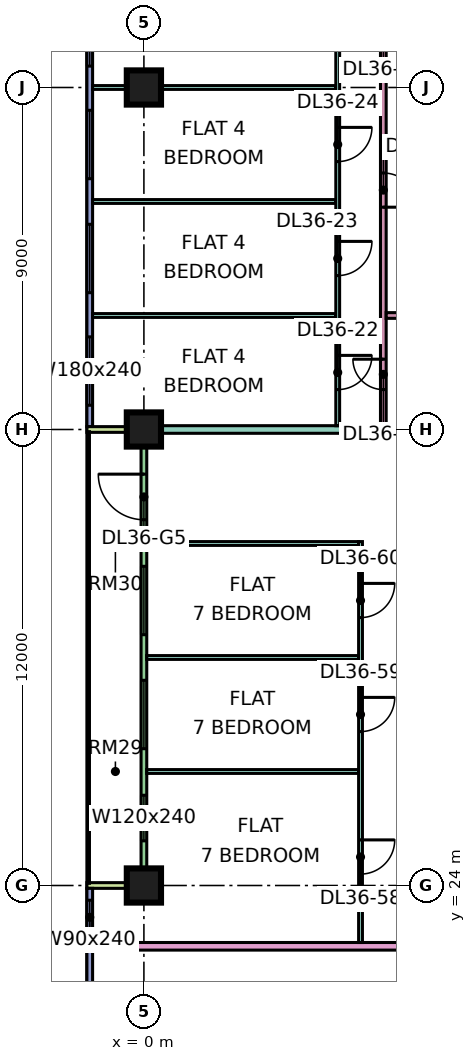
"""IFC4 building model, lengths in metres.
Left out: names, types, materials, properties, quantities, classifications, styles, units other than length and angle.
Written with IfcOpenShell. Run it as: python <this file> out.ifc"""

import sys

from ifc_helpers import new_model, si_unit, direction, frame, frame_2d, origin, origin_2d, place, context, subcontext, project, spatial, rectangle, extrude, element, fill, save


model = new_model("IFC4")
c1 = context("Model", 3, precision=1e-05, world=origin(), true_north=direction((0.0, 1.0)))
c2 = subcontext(c1, "Body", "Model", "MODEL_VIEW")
j1 = project(units=[si_unit("LENGTHUNIT", "METRE"), si_unit("PLANEANGLEUNIT", "RADIAN")], contexts=[c1])
p1 = place(None, origin())
s1 = spatial("IfcSite", under=j1, at=p1, CompositionType="ELEMENT")
p2 = place(p1, origin())
s2 = spatial("IfcBuilding", under=s1, at=p2, CompositionType="ELEMENT")
p3 = place(p2, frame((0.0, 0.0, 161.15)))
s3 = spatial("IfcBuildingStorey", under=s2, at=p3, CompositionType="ELEMENT", Elevation=161.15)
p4 = place(p3, frame((0.0, 24.0, 0.0), z_axis=(0.0, 0.0, 1.0), x_axis=(1.0, 0.0, 0.0)))
e1 = element("IfcColumn", 1, at=p4, inside=s3, PredefinedType="COLUMN", context=c2, shape_type="SweptSolid", body=[
    extrude(rectangle(XDim=0.9, YDim=0.9, at=origin_2d()), origin(), (0.0, 0.0, 1.0), 3.75),
])
p5 = place(p3, frame((0.0, 36.0, 0.0), z_axis=(0.0, 0.0, 1.0), x_axis=(1.0, 0.0, 0.0)))
e2 = element("IfcColumn", 2, at=p5, inside=s3, PredefinedType="COLUMN", context=c2, shape_type="SweptSolid", body=[
    extrude(rectangle(XDim=0.9, YDim=0.9, at=origin_2d()), origin(), (0.0, 0.0, 1.0), 3.75),
])
p6 = place(p3, frame((0.0, 45.0, 0.0), z_axis=(0.0, 0.0, 1.0), x_axis=(1.0, 0.0, 0.0)))
e3 = element("IfcColumn", 3, at=p6, inside=s3, PredefinedType="COLUMN", context=c2, shape_type="SweptSolid", body=[
    extrude(rectangle(XDim=0.9, YDim=0.9, at=origin_2d()), origin(), (0.0, 0.0, 1.0), 3.75),
])
p7 = place(p3, frame((-1.425, 47.925, 0.0), z_axis=(0.0, 0.0, 1.0), x_axis=(0.0, -1.0, 0.0)))
e4 = element("IfcWall", 4, at=p7, inside=s3, PredefinedType="SOLIDWALL", context=c2, shape_type="SweptSolid", body=[
    extrude(rectangle(XDim=11.85, YDim=0.15, at=frame_2d((5.925, 0.0))), origin(), (0.0, 0.0, 1.0), 3.35),
])
p8 = place(p7, frame((0.562, 0.0, 0.45)))
e5 = element("IfcOpeningElement", 5, at=p8, cuts=e4, PredefinedType="OPENING", context=c2, shape_type="SweptSolid", body=[
    extrude(rectangle(XDim=1.8, YDim=2.4, at=frame_2d((0.9, 1.2))), frame((0.0, 0.085, 0.0), z_axis=(0.0, -1.0, 0.0), x_axis=(1.0, 0.0, 0.0)), (0.0, 0.0, 1.0), 0.17),
])
p9 = place(p7, frame((3.525, 0.0, 0.45)))
e6 = element("IfcOpeningElement", 6, at=p9, cuts=e4, PredefinedType="OPENING", context=c2, shape_type="SweptSolid", body=[
    extrude(rectangle(XDim=1.8, YDim=2.4, at=frame_2d((0.9, 1.2))), frame((0.0, 0.085, 0.0), z_axis=(0.0, -1.0, 0.0), x_axis=(1.0, 0.0, 0.0)), (0.0, 0.0, 1.0), 0.17),
])
p10 = place(p7, frame((6.525, 0.0, 0.45)))
e7 = element("IfcOpeningElement", 7, at=p10, cuts=e4, PredefinedType="OPENING", context=c2, shape_type="SweptSolid", body=[
    extrude(rectangle(XDim=1.8, YDim=2.4, at=frame_2d((0.9, 1.2))), frame((0.0, 0.085, 0.0), z_axis=(0.0, -1.0, 0.0), x_axis=(1.0, 0.0, 0.0)), (0.0, 0.0, 1.0), 0.17),
])
p11 = place(p7, frame((9.488, 0.0, 0.45)))
e8 = element("IfcOpeningElement", 8, at=p11, cuts=e4, PredefinedType="OPENING", context=c2, shape_type="SweptSolid", body=[
    extrude(rectangle(XDim=1.8, YDim=2.4, at=frame_2d((0.9, 1.2))), frame((0.0, 0.085, 0.0), z_axis=(0.0, -1.0, 0.0), x_axis=(1.0, 0.0, 0.0)), (0.0, 0.0, 1.0), 0.17),
])
p12 = place(p3, frame((0.0, 35.925, 0.0), z_axis=(0.0, 0.0, 1.0), x_axis=(0.0, -1.0, 0.0)))
e9 = element("IfcWall", 9, at=p12, inside=s3, PredefinedType="SOLIDWALL", context=c2, shape_type="SweptSolid", body=[
    extrude(rectangle(XDim=11.85, YDim=0.15, at=frame_2d((5.925, 0.0))), origin(), (0.0, 0.0, 1.0), 3.35),
])
p13 = place(p12, frame((1.1, 0.0, 0.0)))
e10 = element("IfcOpeningElement", 10, at=p13, cuts=e9, PredefinedType="OPENING", context=c2, shape_type="SweptSolid", body=[
    extrude(rectangle(XDim=1.2, YDim=2.4, at=frame_2d((0.6, 1.2))), frame((0.0, 0.085, 0.0), z_axis=(0.0, -1.0, 0.0), x_axis=(1.0, 0.0, 0.0)), (0.0, 0.0, 1.0), 0.17),
])
p14 = place(p12, frame((3.525, 0.0, 0.45)))
e11 = element("IfcOpeningElement", 11, at=p14, cuts=e9, PredefinedType="OPENING", context=c2, shape_type="SweptSolid", body=[
    extrude(rectangle(XDim=1.8, YDim=2.4, at=frame_2d((0.9, 1.2))), frame((0.0, 0.085, 0.0), z_axis=(0.0, -1.0, 0.0), x_axis=(1.0, 0.0, 0.0)), (0.0, 0.0, 1.0), 0.17),
])
p15 = place(p12, frame((6.525, 0.0, 0.45)))
e12 = element("IfcOpeningElement", 12, at=p15, cuts=e9, PredefinedType="OPENING", context=c2, shape_type="SweptSolid", body=[
    extrude(rectangle(XDim=1.8, YDim=2.4, at=frame_2d((0.9, 1.2))), frame((0.0, 0.085, 0.0), z_axis=(0.0, -1.0, 0.0), x_axis=(1.0, 0.0, 0.0)), (0.0, 0.0, 1.0), 0.17),
])
p16 = place(p12, frame((9.55, 0.0, 0.45)))
e13 = element("IfcOpeningElement", 13, at=p16, cuts=e9, PredefinedType="OPENING", context=c2, shape_type="SweptSolid", body=[
    extrude(rectangle(XDim=1.2, YDim=2.4, at=frame_2d((0.6, 1.2))), frame((0.0, 0.085, 0.0), z_axis=(0.0, -1.0, 0.0), x_axis=(1.0, 0.0, 0.0)), (0.0, 0.0, 1.0), 0.17),
])
for number, where, z_axis, x_axis in (
    (14, (-1.5, 36.0, 0.0), (0.0, 0.0, 1.0), (1.0, 0.0, 0.0)),
    (15, (-1.5, 24.0, 0.0), (0.0, 0.0, 1.0), (1.0, 0.0, 0.0)),
):
    element("IfcWall", number, at=place(p3, frame(where, z_axis=z_axis, x_axis=x_axis)), inside=s3, PredefinedType="SOLIDWALL", context=c2, shape_type="SweptSolid", body=[
        extrude(rectangle(XDim=1.5, YDim=0.15, at=frame_2d((0.75, 0.0))), origin(), (0.0, 0.0, 1.0), 3.35),
    ])
p17 = place(p3, frame((-1.425, 23.925, 0.0), z_axis=(0.0, 0.0, 1.0), x_axis=(0.0, -1.0, 0.0)))
e16 = element("IfcWall", 16, at=p17, inside=s3, PredefinedType="SOLIDWALL", context=c2, shape_type="SweptSolid", body=[
    extrude(rectangle(XDim=11.425, YDim=0.15, at=frame_2d((5.712, 0.0))), origin(), (0.0, 0.0, 1.0), 3.35),
])
p18 = place(p17, frame((0.312, 0.0, 0.45)))
e17 = element("IfcOpeningElement", 17, at=p18, cuts=e16, PredefinedType="OPENING", context=c2, shape_type="SweptSolid", body=[
    extrude(rectangle(XDim=0.9, YDim=2.4, at=frame_2d((0.45, 1.2))), frame((0.0, 0.085, 0.0), z_axis=(0.0, -1.0, 0.0), x_axis=(1.0, 0.0, 0.0)), (0.0, 0.0, 1.0), 0.17),
])
p19 = place(p17, frame((6.175, 0.0, 0.45)))
e18 = element("IfcOpeningElement", 18, at=p19, cuts=e16, PredefinedType="OPENING", context=c2, shape_type="SweptSolid", body=[
    extrude(rectangle(XDim=3.0, YDim=2.4, at=frame_2d((1.5, 1.2))), frame((0.0, 0.085, 0.0), z_axis=(0.0, -1.0, 0.0), x_axis=(1.0, 0.0, 0.0)), (0.0, 0.0, 1.0), 0.17),
])
for number, where, z_axis, x_axis in (
    (19, (-1.351, 39.0, 0.0), (0.0, 0.0, 1.0), (1.0, 0.0, 0.0)),
    (20, (-1.351, 42.0, 0.0), (0.0, 0.0, 1.0), (1.0, 0.0, 0.0)),
    (21, (-1.351, 45.0, 0.0), (0.0, 0.0, 1.0), (1.0, 0.0, 0.0)),
):
    element("IfcWall", number, at=place(p3, frame(where, z_axis=z_axis, x_axis=x_axis)), inside=s3, PredefinedType="PARTITIONING", context=c2, shape_type="SweptSolid", body=[
        extrude(rectangle(XDim=6.401, YDim=0.1, at=frame_2d((3.201, 0.0))), origin(), (0.0, 0.0, 1.0), 3.35),
    ])
p20 = place(p3, frame((-1.35, 22.4, 0.0), z_axis=(0.0, 0.0, 1.0), x_axis=(1.0, 0.0, 0.0)))
e22 = element("IfcWall", 22, at=p20, inside=s3, PredefinedType="PARTITIONING", context=c2, shape_type="SweptSolid", body=[
    extrude(rectangle(XDim=10.85, YDim=0.2, at=frame_2d((5.425, 0.0))), origin(), (0.0, 0.0, 1.0), 3.35),
])
e23 = element("IfcWall", 23, at=p5, inside=s3, PredefinedType="PARTITIONING", context=c2, shape_type="SweptSolid", body=[
    extrude(rectangle(XDim=9.5, YDim=0.2, at=frame_2d((4.75, 0.0))), origin(), (0.0, 0.0, 1.0), 3.35),
])
for number, where, z_axis, x_axis in (
    (24, (0.074, 27.0, 0.0), (0.0, 0.0, 1.0), (1.0, 0.0, 0.0)),
    (25, (0.074, 30.0, 0.0), (0.0, 0.0, 1.0), (1.0, 0.0, 0.0)),
    (26, (0.074, 33.0, 0.0), (0.0, 0.0, 1.0), (1.0, 0.0, 0.0)),
):
    element("IfcWall", number, at=place(p3, frame(where, z_axis=z_axis, x_axis=x_axis)), inside=s3, PredefinedType="PARTITIONING", context=c2, shape_type="SweptSolid", body=[
        extrude(rectangle(XDim=5.576, YDim=0.1, at=frame_2d((2.788, 0.0))), origin(), (0.0, 0.0, 1.0), 3.35),
    ])
p21 = place(p3, frame((5.1, 36.1, 0.0), z_axis=(0.0, 0.0, 1.0), x_axis=(0.0, 1.0, 0.0)))
e27 = element("IfcWall", 27, at=p21, inside=s3, PredefinedType="PARTITIONING", context=c2, shape_type="SweptSolid", body=[
    extrude(rectangle(XDim=26.826, YDim=0.1, at=frame_2d((13.413, 0.0))), origin(), (0.0, 0.0, 1.0), 3.35),
])
p22 = place(p21, frame((0.95, 0.0, 0.0)))
e28 = element("IfcOpeningElement", 28, at=p22, cuts=e27, PredefinedType="OPENING", context=c2, shape_type="SweptSolid", body=[
    extrude(rectangle(XDim=0.9, YDim=2.1, at=frame_2d((0.45, 1.05))), frame((0.0, 0.06, 0.0), z_axis=(0.0, -1.0, 0.0), x_axis=(1.0, 0.0, 0.0)), (0.0, 0.0, 1.0), 0.12),
])
p23 = place(p21, frame((3.95, 0.0, 0.0)))
e29 = element("IfcOpeningElement", 29, at=p23, cuts=e27, PredefinedType="OPENING", context=c2, shape_type="SweptSolid", body=[
    extrude(rectangle(XDim=0.9, YDim=2.1, at=frame_2d((0.45, 1.05))), frame((0.0, 0.06, 0.0), z_axis=(0.0, -1.0, 0.0), x_axis=(1.0, 0.0, 0.0)), (0.0, 0.0, 1.0), 0.12),
])
p24 = place(p21, frame((6.95, 0.0, 0.0)))
e30 = element("IfcOpeningElement", 30, at=p24, cuts=e27, PredefinedType="OPENING", context=c2, shape_type="SweptSolid", body=[
    extrude(rectangle(XDim=0.9, YDim=2.1, at=frame_2d((0.45, 1.05))), frame((0.0, 0.06, 0.0), z_axis=(0.0, -1.0, 0.0), x_axis=(1.0, 0.0, 0.0)), (0.0, 0.0, 1.0), 0.12),
])
p25 = place(p21, frame((9.95, 0.0, 0.0)))
e31 = element("IfcOpeningElement", 31, at=p25, cuts=e27, PredefinedType="OPENING", context=c2, shape_type="SweptSolid", body=[
    extrude(rectangle(XDim=0.9, YDim=2.1, at=frame_2d((0.45, 1.05))), frame((0.0, 0.06, 0.0), z_axis=(0.0, -1.0, 0.0), x_axis=(1.0, 0.0, 0.0)), (0.0, 0.0, 1.0), 0.12),
])
p26 = place(p21, frame((21.95, 0.0, 0.0)))
e32 = element("IfcOpeningElement", 32, at=p26, cuts=e27, PredefinedType="OPENING", context=c2, shape_type="SweptSolid", body=[
    extrude(rectangle(XDim=0.9, YDim=2.1, at=frame_2d((0.45, 1.05))), frame((0.0, 0.06, 0.0), z_axis=(0.0, -1.0, 0.0), x_axis=(1.0, 0.0, 0.0)), (0.0, 0.0, 1.0), 0.12),
])
p27 = place(p21, frame((15.95, 0.0, 0.0)))
e33 = element("IfcOpeningElement", 33, at=p27, cuts=e27, PredefinedType="OPENING", context=c2, shape_type="SweptSolid", body=[
    extrude(rectangle(XDim=0.9, YDim=2.1, at=frame_2d((0.45, 1.05))), frame((0.0, 0.06, 0.0), z_axis=(0.0, -1.0, 0.0), x_axis=(1.0, 0.0, 0.0)), (0.0, 0.0, 1.0), 0.12),
])
p28 = place(p21, frame((24.95, 0.0, 0.0)))
e34 = element("IfcOpeningElement", 34, at=p28, cuts=e27, PredefinedType="OPENING", context=c2, shape_type="SweptSolid", body=[
    extrude(rectangle(XDim=0.9, YDim=2.1, at=frame_2d((0.45, 1.05))), frame((0.0, 0.06, 0.0), z_axis=(0.0, -1.0, 0.0), x_axis=(1.0, 0.0, 0.0)), (0.0, 0.0, 1.0), 0.12),
])
p29 = place(p3, frame((5.7, 22.5, 0.0), z_axis=(0.0, 0.0, 1.0), x_axis=(0.0, 1.0, 0.0)))
e35 = element("IfcWall", 35, at=p29, inside=s3, PredefinedType="PARTITIONING", context=c2, shape_type="SweptSolid", body=[
    extrude(rectangle(XDim=10.55, YDim=0.1, at=frame_2d((5.275, 0.0))), origin(), (0.0, 0.0, 1.0), 3.35),
])
p30 = place(p29, frame((1.8, 0.0, 0.0)))
e36 = element("IfcOpeningElement", 36, at=p30, cuts=e35, PredefinedType="OPENING", context=c2, shape_type="SweptSolid", body=[
    extrude(rectangle(XDim=0.9, YDim=2.1, at=frame_2d((0.45, 1.05))), frame((0.0, 0.06, 0.0), z_axis=(0.0, -1.0, 0.0), x_axis=(1.0, 0.0, 0.0)), (0.0, 0.0, 1.0), 0.12),
])
p31 = place(p29, frame((5.55, 0.0, 0.0)))
e37 = element("IfcOpeningElement", 37, at=p31, cuts=e35, PredefinedType="OPENING", context=c2, shape_type="SweptSolid", body=[
    extrude(rectangle(XDim=0.9, YDim=2.1, at=frame_2d((0.45, 1.05))), frame((0.0, 0.06, 0.0), z_axis=(0.0, -1.0, 0.0), x_axis=(1.0, 0.0, 0.0)), (0.0, 0.0, 1.0), 0.12),
])
p32 = place(p29, frame((8.55, 0.0, 0.0)))
e38 = element("IfcOpeningElement", 38, at=p32, cuts=e35, PredefinedType="OPENING", context=c2, shape_type="SweptSolid", body=[
    extrude(rectangle(XDim=0.9, YDim=2.1, at=frame_2d((0.45, 1.05))), frame((0.0, 0.06, 0.0), z_axis=(0.0, -1.0, 0.0), x_axis=(1.0, 0.0, 0.0)), (0.0, 0.0, 1.0), 0.12),
])
p33 = place(p3, frame((6.3, 36.1, 0.0), z_axis=(0.0, 0.0, 1.0), x_axis=(0.0, 1.0, 0.0)))
e39 = element("IfcWall", 39, at=p33, inside=s3, PredefinedType="PARTITIONING", context=c2, shape_type="SweptSolid", body=[
    extrude(rectangle(XDim=23.65, YDim=0.15, at=frame_2d((11.825, 0.0))), origin(), (0.0, 0.0, 1.0), 3.35),
])
p34 = place(p33, frame((15.95, 0.0, 0.0)))
e40 = element("IfcOpeningElement", 40, at=p34, cuts=e39, PredefinedType="OPENING", context=c2, shape_type="SweptSolid", body=[
    extrude(rectangle(XDim=0.8, YDim=2.1, at=frame_2d((0.4, 1.05))), frame((0.0, 0.085, 0.0), z_axis=(0.0, -1.0, 0.0), x_axis=(1.0, 0.0, 0.0)), (0.0, 0.0, 1.0), 0.17),
])
p35 = place(p33, frame((5.75, 0.0, 0.0)))
e41 = element("IfcOpeningElement", 41, at=p35, cuts=e39, PredefinedType="OPENING", context=c2, shape_type="SweptSolid", body=[
    extrude(rectangle(XDim=0.9, YDim=2.1, at=frame_2d((0.45, 1.05))), frame((0.0, 0.085, 0.0), z_axis=(0.0, -1.0, 0.0), x_axis=(1.0, 0.0, 0.0)), (0.0, 0.0, 1.0), 0.17),
])
p36 = place(p33, frame((0.95, 0.0, 0.0)))
e42 = element("IfcOpeningElement", 42, at=p36, cuts=e39, PredefinedType="OPENING", context=c2, shape_type="SweptSolid", body=[
    extrude(rectangle(XDim=0.8, YDim=2.1, at=frame_2d((0.4, 1.05))), frame((0.0, 0.085, 0.0), z_axis=(0.0, -1.0, 0.0), x_axis=(1.0, 0.0, 0.0)), (0.0, 0.0, 1.0), 0.17),
])
p37 = place(p33, frame((10.55, 0.0, 0.0)))
e43 = element("IfcOpeningElement", 43, at=p37, cuts=e39, PredefinedType="OPENING", context=c2, shape_type="SweptSolid", body=[
    extrude(rectangle(XDim=0.8, YDim=2.1, at=frame_2d((0.4, 1.05))), frame((0.0, 0.085, 0.0), z_axis=(0.0, -1.0, 0.0), x_axis=(1.0, 0.0, 0.0)), (0.0, 0.0, 1.0), 0.17),
])
p38 = place(p33, frame((13.4, 0.0, 0.0)))
e44 = element("IfcOpeningElement", 44, at=p38, cuts=e39, PredefinedType="OPENING", context=c2, shape_type="SweptSolid", body=[
    extrude(rectangle(XDim=0.8, YDim=2.1, at=frame_2d((0.4, 1.05))), frame((0.0, 0.085, 0.0), z_axis=(0.0, -1.0, 0.0), x_axis=(1.0, 0.0, 0.0)), (0.0, 0.0, 1.0), 0.17),
])
for number, where, z_axis, x_axis in (
    (45, (6.375, 39.0, 0.0), (0.0, 0.0, 1.0), (1.0, 0.0, 0.0)),
    (46, (6.375, 45.6, 0.0), (0.0, 0.0, 1.0), (1.0, 0.0, 0.0)),
):
    element("IfcWall", number, at=place(p3, frame(where, z_axis=z_axis, x_axis=x_axis)), inside=s3, PredefinedType="PARTITIONING", context=c2, shape_type="SweptSolid", body=[
        extrude(rectangle(XDim=3.125, YDim=0.15, at=frame_2d((1.562, 0.0))), origin(), (0.0, 0.0, 1.0), 3.35),
    ])
p39 = place(p8, origin())
e47 = element("IfcWindow", 47, at=p39, inside=s3, PartitioningType="SINGLE_PANEL", PredefinedType="WINDOW", context=c2, shape_type="SweptSolid", body=[
    extrude(rectangle(XDim=1.8, YDim=2.4, at=frame_2d((0.9, 1.2))), frame((0.0, 0.03, 0.0), z_axis=(0.0, -1.0, 0.0), x_axis=(1.0, 0.0, 0.0)), (0.0, 0.0, 1.0), 0.06),
])
fill(e5, e47)
p40 = place(p9, origin())
e48 = element("IfcWindow", 48, at=p40, inside=s3, PartitioningType="SINGLE_PANEL", PredefinedType="WINDOW", context=c2, shape_type="SweptSolid", body=[
    extrude(rectangle(XDim=1.8, YDim=2.4, at=frame_2d((0.9, 1.2))), frame((0.0, 0.03, 0.0), z_axis=(0.0, -1.0, 0.0), x_axis=(1.0, 0.0, 0.0)), (0.0, 0.0, 1.0), 0.06),
])
fill(e6, e48)
p41 = place(p10, origin())
e49 = element("IfcWindow", 49, at=p41, inside=s3, PartitioningType="SINGLE_PANEL", PredefinedType="WINDOW", context=c2, shape_type="SweptSolid", body=[
    extrude(rectangle(XDim=1.8, YDim=2.4, at=frame_2d((0.9, 1.2))), frame((0.0, 0.03, 0.0), z_axis=(0.0, -1.0, 0.0), x_axis=(1.0, 0.0, 0.0)), (0.0, 0.0, 1.0), 0.06),
])
fill(e7, e49)
p42 = place(p11, origin())
e50 = element("IfcWindow", 50, at=p42, inside=s3, PartitioningType="SINGLE_PANEL", PredefinedType="WINDOW", context=c2, shape_type="SweptSolid", body=[
    extrude(rectangle(XDim=1.8, YDim=2.4, at=frame_2d((0.9, 1.2))), frame((0.0, 0.03, 0.0), z_axis=(0.0, -1.0, 0.0), x_axis=(1.0, 0.0, 0.0)), (0.0, 0.0, 1.0), 0.06),
])
fill(e8, e50)
p43 = place(p13, frame((1.2, 0.0, 0.0), z_axis=(0.0, 0.0, 1.0), x_axis=(-1.0, 0.0, 0.0)))
e51 = element("IfcDoor", 51, at=p43, inside=s3, OperationType="DOUBLE_DOOR_SINGLE_SWING", PredefinedType="DOOR", context=c2, shape_type="SweptSolid", body=[
    extrude(rectangle(XDim=1.2, YDim=2.4, at=frame_2d((0.6, 1.2))), frame((0.0, 0.025, 0.0), z_axis=(0.0, -1.0, 0.0), x_axis=(1.0, 0.0, 0.0)), (0.0, 0.0, 1.0), 0.05),
])
fill(e10, e51)
p44 = place(p14, origin())
e52 = element("IfcWindow", 52, at=p44, inside=s3, PartitioningType="SINGLE_PANEL", PredefinedType="WINDOW", context=c2, shape_type="SweptSolid", body=[
    extrude(rectangle(XDim=1.8, YDim=2.4, at=frame_2d((0.9, 1.2))), frame((0.0, 0.03, 0.0), z_axis=(0.0, -1.0, 0.0), x_axis=(1.0, 0.0, 0.0)), (0.0, 0.0, 1.0), 0.06),
])
fill(e11, e52)
p45 = place(p15, origin())
e53 = element("IfcWindow", 53, at=p45, inside=s3, PartitioningType="SINGLE_PANEL", PredefinedType="WINDOW", context=c2, shape_type="SweptSolid", body=[
    extrude(rectangle(XDim=1.8, YDim=2.4, at=frame_2d((0.9, 1.2))), frame((0.0, 0.03, 0.0), z_axis=(0.0, -1.0, 0.0), x_axis=(1.0, 0.0, 0.0)), (0.0, 0.0, 1.0), 0.06),
])
fill(e12, e53)
p46 = place(p16, origin())
e54 = element("IfcWindow", 54, at=p46, inside=s3, PartitioningType="SINGLE_PANEL", PredefinedType="WINDOW", context=c2, shape_type="SweptSolid", body=[
    extrude(rectangle(XDim=1.2, YDim=2.4, at=frame_2d((0.6, 1.2))), frame((0.0, 0.03, 0.0), z_axis=(0.0, -1.0, 0.0), x_axis=(1.0, 0.0, 0.0)), (0.0, 0.0, 1.0), 0.06),
])
fill(e13, e54)
p47 = place(p18, origin())
e55 = element("IfcWindow", 55, at=p47, inside=s3, PartitioningType="SINGLE_PANEL", PredefinedType="WINDOW", context=c2, shape_type="SweptSolid", body=[
    extrude(rectangle(XDim=0.9, YDim=2.4, at=frame_2d((0.45, 1.2))), frame((0.0, 0.03, 0.0), z_axis=(0.0, -1.0, 0.0), x_axis=(1.0, 0.0, 0.0)), (0.0, 0.0, 1.0), 0.06),
])
fill(e17, e55)
p48 = place(p22, origin())
e56 = element("IfcDoor", 56, at=p48, inside=s3, OperationType="SINGLE_SWING_RIGHT", PredefinedType="DOOR", context=c2, shape_type="SweptSolid", body=[
    extrude(rectangle(XDim=0.9, YDim=2.1, at=frame_2d((0.45, 1.05))), frame((0.0, 0.025, 0.0), z_axis=(0.0, -1.0, 0.0), x_axis=(1.0, 0.0, 0.0)), (0.0, 0.0, 1.0), 0.05),
])
fill(e28, e56)
p49 = place(p23, origin())
e57 = element("IfcDoor", 57, at=p49, inside=s3, OperationType="SINGLE_SWING_RIGHT", PredefinedType="DOOR", context=c2, shape_type="SweptSolid", body=[
    extrude(rectangle(XDim=0.9, YDim=2.1, at=frame_2d((0.45, 1.05))), frame((0.0, 0.025, 0.0), z_axis=(0.0, -1.0, 0.0), x_axis=(1.0, 0.0, 0.0)), (0.0, 0.0, 1.0), 0.05),
])
fill(e29, e57)
p50 = place(p24, origin())
e58 = element("IfcDoor", 58, at=p50, inside=s3, OperationType="SINGLE_SWING_RIGHT", PredefinedType="DOOR", context=c2, shape_type="SweptSolid", body=[
    extrude(rectangle(XDim=0.9, YDim=2.1, at=frame_2d((0.45, 1.05))), frame((0.0, 0.025, 0.0), z_axis=(0.0, -1.0, 0.0), x_axis=(1.0, 0.0, 0.0)), (0.0, 0.0, 1.0), 0.05),
])
fill(e30, e58)
p51 = place(p35, frame((0.9, 0.0, 0.0), z_axis=(0.0, 0.0, 1.0), x_axis=(-1.0, 0.0, 0.0)))
e59 = element("IfcDoor", 59, at=p51, inside=s3, OperationType="SINGLE_SWING_LEFT", PredefinedType="DOOR", context=c2, shape_type="SweptSolid", body=[
    extrude(rectangle(XDim=0.9, YDim=2.1, at=frame_2d((0.45, 1.05))), frame((0.0, 0.025, 0.0), z_axis=(0.0, -1.0, 0.0), x_axis=(1.0, 0.0, 0.0)), (0.0, 0.0, 1.0), 0.05),
])
fill(e41, e59)
p52 = place(p36, frame((0.8, 0.0, 0.0), z_axis=(0.0, 0.0, 1.0), x_axis=(-1.0, 0.0, 0.0)))
e60 = element("IfcDoor", 60, at=p52, inside=s3, OperationType="SINGLE_SWING_RIGHT", PredefinedType="DOOR", context=c2, shape_type="SweptSolid", body=[
    extrude(rectangle(XDim=0.8, YDim=2.1, at=frame_2d((0.4, 1.05))), frame((0.0, 0.025, 0.0), z_axis=(0.0, -1.0, 0.0), x_axis=(1.0, 0.0, 0.0)), (0.0, 0.0, 1.0), 0.05),
])
fill(e42, e60)
p53 = place(p30, origin())
e61 = element("IfcDoor", 61, at=p53, inside=s3, OperationType="SINGLE_SWING_RIGHT", PredefinedType="DOOR", context=c2, shape_type="SweptSolid", body=[
    extrude(rectangle(XDim=0.9, YDim=2.1, at=frame_2d((0.45, 1.05))), frame((0.0, 0.025, 0.0), z_axis=(0.0, -1.0, 0.0), x_axis=(1.0, 0.0, 0.0)), (0.0, 0.0, 1.0), 0.05),
])
fill(e36, e61)
p54 = place(p31, origin())
e62 = element("IfcDoor", 62, at=p54, inside=s3, OperationType="SINGLE_SWING_RIGHT", PredefinedType="DOOR", context=c2, shape_type="SweptSolid", body=[
    extrude(rectangle(XDim=0.9, YDim=2.1, at=frame_2d((0.45, 1.05))), frame((0.0, 0.025, 0.0), z_axis=(0.0, -1.0, 0.0), x_axis=(1.0, 0.0, 0.0)), (0.0, 0.0, 1.0), 0.05),
])
fill(e37, e62)
p55 = place(p32, origin())
e63 = element("IfcDoor", 63, at=p55, inside=s3, OperationType="SINGLE_SWING_RIGHT", PredefinedType="DOOR", context=c2, shape_type="SweptSolid", body=[
    extrude(rectangle(XDim=0.9, YDim=2.1, at=frame_2d((0.45, 1.05))), frame((0.0, 0.025, 0.0), z_axis=(0.0, -1.0, 0.0), x_axis=(1.0, 0.0, 0.0)), (0.0, 0.0, 1.0), 0.05),
])
fill(e38, e63)
save(model, sys.argv[1])
